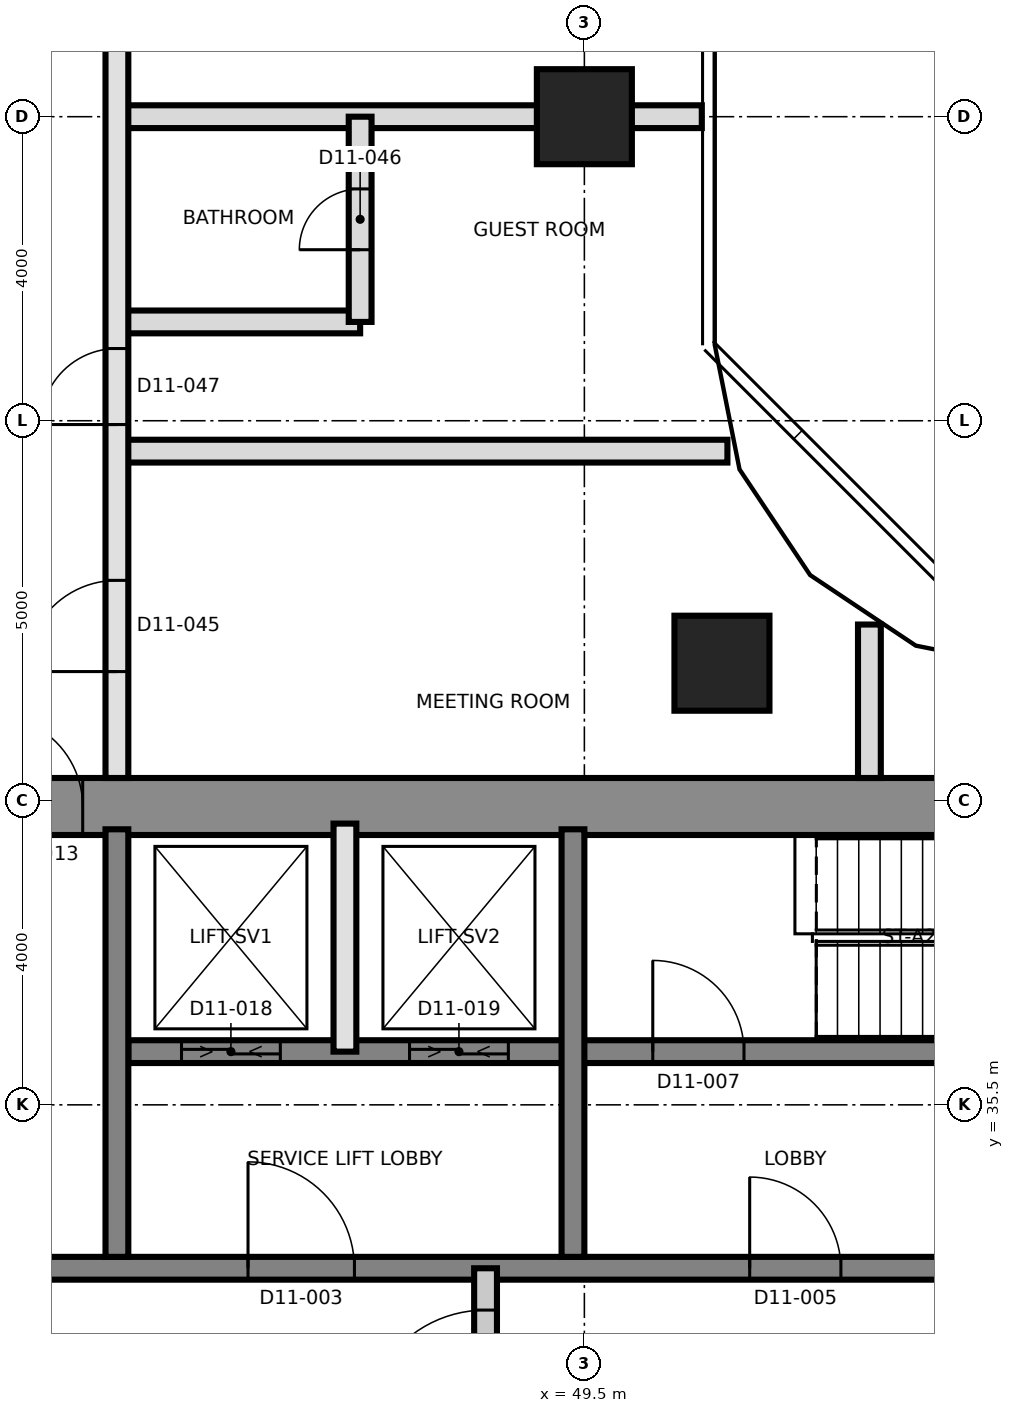
"""IFC4 building model, lengths in metres.
Left out: names, types, materials, properties, quantities, classifications, styles, units other than length and angle.
Written with IfcOpenShell. Run it as: python <this file> out.ifc"""

import sys

from ifc_helpers import new_model, si_unit, direction, frame, frame_2d, origin, origin_2d, place, context, subcontext, project, spatial, rectangle, extrude, element, fill, save


model = new_model("IFC4")
c1 = context("Model", 3, precision=1e-05, world=origin(), true_north=direction((0.0, 1.0)))
c2 = subcontext(c1, "Body", "Model", "MODEL_VIEW")
j1 = project(units=[si_unit("LENGTHUNIT", "METRE"), si_unit("PLANEANGLEUNIT", "RADIAN")], contexts=[c1])
p1 = place(None, origin())
s1 = spatial("IfcSite", under=j1, at=p1, CompositionType="ELEMENT")
p2 = place(p1, origin())
s2 = spatial("IfcBuilding", under=s1, at=p2, CompositionType="ELEMENT")
p3 = place(p2, frame((0.0, 0.0, 124.1)))
s3 = spatial("IfcBuildingStorey", under=s2, at=p3, CompositionType="ELEMENT", Elevation=124.1)
p4 = place(p3, frame((31.125, 39.425, 0.0), z_axis=(0.0, 0.0, 1.0), x_axis=(1.0, 0.0, 0.0)))
e1 = element("IfcWall", 1, at=p4, inside=s3, PredefinedType="SHEAR", context=c2, shape_type="SweptSolid", body=[
    extrude(rectangle(XDim=27.0, YDim=0.75, at=frame_2d((13.5, 0.0))), origin(), (0.0, 0.0, 1.0), 3.7),
])
p5 = place(p4, frame((10.575, 0.0, 0.0)))
e2 = element("IfcOpeningElement", 2, at=p5, cuts=e1, PredefinedType="OPENING", context=c2, shape_type="SweptSolid", body=[
    extrude(rectangle(XDim=1.2, YDim=2.1, at=frame_2d((0.6, 1.05))), frame((0.0, 0.385, 0.0), z_axis=(0.0, -1.0, 0.0), x_axis=(1.0, 0.0, 0.0)), (0.0, 0.0, 1.0), 0.77),
])
p6 = place(p3, frame((31.875, 33.35, 0.0), z_axis=(0.0, 0.0, 1.0), x_axis=(1.0, 0.0, 0.0)))
e3 = element("IfcWall", 3, at=p6, inside=s3, PredefinedType="SHEAR", context=c2, shape_type="SweptSolid", body=[
    extrude(rectangle(XDim=26.25, YDim=0.3, at=frame_2d((13.125, 0.0))), origin(), (0.0, 0.0, 1.0), 3.7),
])
p7 = place(p6, frame((13.2, 0.0, 0.0)))
e4 = element("IfcOpeningElement", 4, at=p7, cuts=e3, PredefinedType="OPENING", context=c2, shape_type="SweptSolid", body=[
    extrude(rectangle(XDim=1.4, YDim=2.1, at=frame_2d((0.7, 1.05))), frame((0.0, 0.16, 0.0), z_axis=(0.0, -1.0, 0.0), x_axis=(1.0, 0.0, 0.0)), (0.0, 0.0, 1.0), 0.32),
])
p8 = place(p6, frame((5.25, 0.0, 0.0)))
e5 = element("IfcOpeningElement", 5, at=p8, cuts=e3, PredefinedType="OPENING", context=c2, shape_type="SweptSolid", body=[
    extrude(rectangle(XDim=1.2, YDim=2.1, at=frame_2d((0.6, 1.05))), frame((0.0, 0.16, 0.0), z_axis=(0.0, -1.0, 0.0), x_axis=(1.0, 0.0, 0.0)), (0.0, 0.0, 1.0), 0.32),
])
p9 = place(p6, frame((19.8, 0.0, 0.0)))
e6 = element("IfcOpeningElement", 6, at=p9, cuts=e3, PredefinedType="OPENING", context=c2, shape_type="SweptSolid", body=[
    extrude(rectangle(XDim=1.2, YDim=2.1, at=frame_2d((0.6, 1.05))), frame((0.0, 0.16, 0.0), z_axis=(0.0, -1.0, 0.0), x_axis=(1.0, 0.0, 0.0)), (0.0, 0.0, 1.0), 0.32),
])
p10 = place(p3, frame((43.5, 36.2, 0.0), z_axis=(0.0, 0.0, 1.0), x_axis=(1.0, 0.0, 0.0)))
e7 = element("IfcWall", 7, at=p10, inside=s3, PredefinedType="SHEAR", context=c2, shape_type="SweptSolid", body=[
    extrude(rectangle(XDim=14.625, YDim=0.3, at=frame_2d((7.312, 0.0))), origin(), (0.0, 0.0, 1.0), 3.7),
])
p11 = place(p10, frame((6.9, 0.0, 0.0)))
e8 = element("IfcOpeningElement", 8, at=p11, cuts=e7, PredefinedType="OPENING", context=c2, shape_type="SweptSolid", body=[
    extrude(rectangle(XDim=1.2, YDim=2.1, at=frame_2d((0.6, 1.05))), frame((0.0, 0.16, 0.0), z_axis=(0.0, -1.0, 0.0), x_axis=(1.0, 0.0, 0.0)), (0.0, 0.0, 1.0), 0.32),
])
p12 = place(p10, frame((0.7, 0.0, 0.0)))
e9 = element("IfcOpeningElement", 9, at=p12, cuts=e7, PredefinedType="OPENING", context=c2, shape_type="SweptSolid", body=[
    extrude(rectangle(XDim=1.3, YDim=2.4, at=frame_2d((0.65, 1.2))), frame((0.0, 0.16, 0.0), z_axis=(0.0, -1.0, 0.0), x_axis=(1.0, 0.0, 0.0)), (0.0, 0.0, 1.0), 0.32),
])
p13 = place(p10, frame((3.7, 0.0, 0.0)))
e10 = element("IfcOpeningElement", 10, at=p13, cuts=e7, PredefinedType="OPENING", context=c2, shape_type="SweptSolid", body=[
    extrude(rectangle(XDim=1.3, YDim=2.4, at=frame_2d((0.65, 1.2))), frame((0.0, 0.16, 0.0), z_axis=(0.0, -1.0, 0.0), x_axis=(1.0, 0.0, 0.0)), (0.0, 0.0, 1.0), 0.32),
])
for number, where, z_axis, x_axis in (
    (11, (43.35, 33.5, 0.0), (0.0, 0.0, 1.0), (0.0, 1.0, 0.0)),
    (12, (49.35, 33.5, 0.0), (0.0, 0.0, 1.0), (0.0, 1.0, 0.0)),
):
    element("IfcWall", number, at=place(p3, frame(where, z_axis=z_axis, x_axis=x_axis)), inside=s3, PredefinedType="SHEAR", context=c2, shape_type="SweptSolid", body=[
        extrude(rectangle(XDim=5.625, YDim=0.3, at=frame_2d((2.812, 0.0))), origin(), (0.0, 0.0, 1.0), 3.7),
    ])
for number, where, z_axis, x_axis in (
    (13, (51.31, 41.31, 0.0), (0.0, 0.0, 1.0), (1.0, 0.0, 0.0)),
    (14, (49.5, 48.5, 0.0), (0.0, 0.0, 1.0), (1.0, 0.0, 0.0)),
):
    element("IfcColumn", number, at=place(p3, frame(where, z_axis=z_axis, x_axis=x_axis)), inside=s3, PredefinedType="COLUMN", context=c2, shape_type="SweptSolid", body=[
        extrude(rectangle(XDim=1.25, YDim=1.25, at=origin_2d()), origin(), (0.0, 0.0, 1.0), 3.7),
    ])
p14 = place(p3, frame((46.35, 36.2, 0.0), z_axis=(0.0, 0.0, 1.0), x_axis=(0.0, 1.0, 0.0)))
e15 = element("IfcWall", 15, at=p14, inside=s3, PredefinedType="SOLIDWALL", context=c2, shape_type="SweptSolid", body=[
    extrude(rectangle(XDim=3.0, YDim=0.3, at=frame_2d((1.5, 0.0))), origin(), (0.0, 0.0, 1.0), 3.4),
])
p15 = place(p3, frame((48.2, 24.9, 0.0), z_axis=(0.0, 0.0, 1.0), x_axis=(0.0, 1.0, 0.0)))
e16 = element("IfcWall", 16, at=p15, inside=s3, PredefinedType="PARTITIONING", context=c2, shape_type="SweptSolid", body=[
    extrude(rectangle(XDim=8.45, YDim=0.3, at=frame_2d((4.225, 0.0))), origin(), (0.0, 0.0, 1.0), 3.4),
])
p16 = place(p15, frame((6.3, 0.0, 0.0)))
e17 = element("IfcOpeningElement", 17, at=p16, cuts=e16, PredefinedType="OPENING", context=c2, shape_type="SweptSolid", body=[
    extrude(rectangle(XDim=1.6, YDim=2.1, at=frame_2d((0.8, 1.05))), frame((0.0, 0.16, 0.0), z_axis=(0.0, -1.0, 0.0), x_axis=(1.0, 0.0, 0.0)), (0.0, 0.0, 1.0), 0.32),
])
p17 = place(p3, frame((43.35, 44.1, 0.0), z_axis=(0.0, 0.0, 1.0), x_axis=(1.0, 0.0, 0.0)))
e18 = element("IfcWall", 18, at=p17, inside=s3, PredefinedType="PARTITIONING", context=c2, shape_type="SweptSolid", body=[
    extrude(rectangle(XDim=8.032, YDim=0.3, at=frame_2d((4.016, 0.0))), origin(), (0.0, 0.0, 1.0), 3.4),
])
p18 = place(p3, frame((43.35, 45.8, 0.0), z_axis=(0.0, 0.0, 1.0), x_axis=(1.0, 0.0, 0.0)))
e19 = element("IfcWall", 19, at=p18, inside=s3, PredefinedType="PARTITIONING", context=c2, shape_type="SweptSolid", body=[
    extrude(rectangle(XDim=3.2, YDim=0.3, at=frame_2d((1.6, 0.0))), origin(), (0.0, 0.0, 1.0), 3.4),
])
p19 = place(p3, frame((43.35, 48.5, 0.0), z_axis=(0.0, 0.0, 1.0), x_axis=(1.0, 0.0, 0.0)))
e20 = element("IfcWall", 20, at=p19, inside=s3, PredefinedType="PARTITIONING", context=c2, shape_type="SweptSolid", body=[
    extrude(rectangle(XDim=7.695, YDim=0.3, at=frame_2d((3.847, 0.0))), origin(), (0.0, 0.0, 1.0), 3.4),
])
p20 = place(p3, frame((43.35, 39.8, 0.0), z_axis=(0.0, 0.0, 1.0), x_axis=(0.0, 1.0, 0.0)))
e21 = element("IfcWall", 21, at=p20, inside=s3, PredefinedType="SOLIDWALL", context=c2, shape_type="SweptSolid", body=[
    extrude(rectangle(XDim=26.0, YDim=0.3, at=frame_2d((13.0, 0.0))), origin(), (0.0, 0.0, 1.0), 3.4),
])
p21 = place(p20, frame((1.4, 0.0, 0.0)))
e22 = element("IfcOpeningElement", 22, at=p21, cuts=e21, PredefinedType="OPENING", context=c2, shape_type="SweptSolid", body=[
    extrude(rectangle(XDim=1.2, YDim=2.1, at=frame_2d((0.6, 1.05))), frame((0.0, 0.16, 0.0), z_axis=(0.0, -1.0, 0.0), x_axis=(1.0, 0.0, 0.0)), (0.0, 0.0, 1.0), 0.32),
])
p22 = place(p20, frame((4.65, 0.0, 0.0)))
e23 = element("IfcOpeningElement", 23, at=p22, cuts=e21, PredefinedType="OPENING", context=c2, shape_type="SweptSolid", body=[
    extrude(rectangle(XDim=1.0, YDim=2.1, at=frame_2d((0.5, 1.05))), frame((0.0, 0.16, 0.0), z_axis=(0.0, -1.0, 0.0), x_axis=(1.0, 0.0, 0.0)), (0.0, 0.0, 1.0), 0.32),
])
p23 = place(p20, frame((9.835, 0.0, 0.0)))
e24 = element("IfcOpeningElement", 24, at=p23, cuts=e21, PredefinedType="OPENING", context=c2, shape_type="SweptSolid", body=[
    extrude(rectangle(XDim=1.2, YDim=2.1, at=frame_2d((0.6, 1.05))), frame((0.0, 0.16, 0.0), z_axis=(0.0, -1.0, 0.0), x_axis=(1.0, 0.0, 0.0)), (0.0, 0.0, 1.0), 0.32),
])
p24 = place(p20, frame((13.085, 0.0, 0.0)))
e25 = element("IfcOpeningElement", 25, at=p24, cuts=e21, PredefinedType="OPENING", context=c2, shape_type="SweptSolid", body=[
    extrude(rectangle(XDim=1.0, YDim=2.1, at=frame_2d((0.5, 1.05))), frame((0.0, 0.16, 0.0), z_axis=(0.0, -1.0, 0.0), x_axis=(1.0, 0.0, 0.0)), (0.0, 0.0, 1.0), 0.32),
])
p25 = place(p20, frame((21.25, 0.0, 0.0)))
e26 = element("IfcOpeningElement", 26, at=p25, cuts=e21, PredefinedType="OPENING", context=c2, shape_type="SweptSolid", body=[
    extrude(rectangle(XDim=1.0, YDim=2.4, at=frame_2d((0.5, 1.2))), frame((0.0, 0.16, 0.0), z_axis=(0.0, -1.0, 0.0), x_axis=(1.0, 0.0, 0.0)), (0.0, 0.0, 1.0), 0.32),
])
p26 = place(p3, frame((46.55, 45.8, 0.0), z_axis=(0.0, 0.0, 1.0), x_axis=(0.0, 1.0, 0.0)))
e27 = element("IfcWall", 27, at=p26, inside=s3, PredefinedType="PARTITIONING", context=c2, shape_type="SweptSolid", body=[
    extrude(rectangle(XDim=2.7, YDim=0.3, at=frame_2d((1.35, 0.0))), origin(), (0.0, 0.0, 1.0), 3.4),
])
p27 = place(p26, frame((0.95, 0.0, 0.0)))
e28 = element("IfcOpeningElement", 28, at=p27, cuts=e27, PredefinedType="OPENING", context=c2, shape_type="SweptSolid", body=[
    extrude(rectangle(XDim=0.8, YDim=2.1, at=frame_2d((0.4, 1.05))), frame((0.0, 0.16, 0.0), z_axis=(0.0, -1.0, 0.0), x_axis=(1.0, 0.0, 0.0)), (0.0, 0.0, 1.0), 0.32),
])
p28 = place(p3, frame((53.25, 39.8, 0.0), z_axis=(0.0, 0.0, 1.0), x_axis=(0.0, 1.0, 0.0)))
e29 = element("IfcWall", 29, at=p28, inside=s3, PredefinedType="PARTITIONING", context=c2, shape_type="SweptSolid", body=[
    extrude(rectangle(XDim=2.019, YDim=0.3, at=frame_2d((1.01, 0.0))), origin(), (0.0, 0.0, 1.0), 3.4),
])
p29 = place(p16, origin())
e30 = element("IfcDoor", 30, at=p29, inside=s3, OperationType="SINGLE_SWING_LEFT", PredefinedType="DOOR", context=c2, shape_type="SweptSolid", body=[
    extrude(rectangle(XDim=1.6, YDim=2.1, at=frame_2d((0.8, 1.05))), frame((0.0, 0.025, 0.0), z_axis=(0.0, -1.0, 0.0), x_axis=(1.0, 0.0, 0.0)), (0.0, 0.0, 1.0), 0.05),
])
fill(e17, e30)
p30 = place(p7, origin())
e31 = element("IfcDoor", 31, at=p30, inside=s3, OperationType="SINGLE_SWING_RIGHT", PredefinedType="DOOR", context=c2, shape_type="SweptSolid", body=[
    extrude(rectangle(XDim=1.4, YDim=2.1, at=frame_2d((0.7, 1.05))), frame((0.0, 0.025, 0.0), z_axis=(0.0, -1.0, 0.0), x_axis=(1.0, 0.0, 0.0)), (0.0, 0.0, 1.0), 0.05),
])
fill(e4, e31)
p31 = place(p9, origin())
e32 = element("IfcDoor", 32, at=p31, inside=s3, OperationType="SINGLE_SWING_RIGHT", PredefinedType="DOOR", context=c2, shape_type="SweptSolid", body=[
    extrude(rectangle(XDim=1.2, YDim=2.1, at=frame_2d((0.6, 1.05))), frame((0.0, 0.025, 0.0), z_axis=(0.0, -1.0, 0.0), x_axis=(1.0, 0.0, 0.0)), (0.0, 0.0, 1.0), 0.05),
])
fill(e6, e32)
p32 = place(p11, origin())
e33 = element("IfcDoor", 33, at=p32, inside=s3, OperationType="SINGLE_SWING_LEFT", PredefinedType="DOOR", context=c2, shape_type="SweptSolid", body=[
    extrude(rectangle(XDim=1.2, YDim=2.1, at=frame_2d((0.6, 1.05))), frame((0.0, 0.025, 0.0), z_axis=(0.0, -1.0, 0.0), x_axis=(1.0, 0.0, 0.0)), (0.0, 0.0, 1.0), 0.05),
])
fill(e8, e33)
p33 = place(p5, origin())
e34 = element("IfcDoor", 34, at=p33, inside=s3, OperationType="SINGLE_SWING_RIGHT", PredefinedType="DOOR", context=c2, shape_type="SweptSolid", body=[
    extrude(rectangle(XDim=1.2, YDim=2.1, at=frame_2d((0.6, 1.05))), frame((0.0, 0.025, 0.0), z_axis=(0.0, -1.0, 0.0), x_axis=(1.0, 0.0, 0.0)), (0.0, 0.0, 1.0), 0.05),
])
fill(e2, e34)
p34 = place(p12, origin())
e35 = element("IfcDoor", 35, at=p34, inside=s3, OperationType="SLIDING_TO_LEFT", PredefinedType="DOOR", context=c2, shape_type="SweptSolid", body=[
    extrude(rectangle(XDim=1.3, YDim=2.4, at=frame_2d((0.65, 1.2))), frame((0.0, 0.025, 0.0), z_axis=(0.0, -1.0, 0.0), x_axis=(1.0, 0.0, 0.0)), (0.0, 0.0, 1.0), 0.05),
])
fill(e9, e35)
p35 = place(p13, origin())
e36 = element("IfcDoor", 36, at=p35, inside=s3, OperationType="SLIDING_TO_LEFT", PredefinedType="DOOR", context=c2, shape_type="SweptSolid", body=[
    extrude(rectangle(XDim=1.3, YDim=2.4, at=frame_2d((0.65, 1.2))), frame((0.0, 0.025, 0.0), z_axis=(0.0, -1.0, 0.0), x_axis=(1.0, 0.0, 0.0)), (0.0, 0.0, 1.0), 0.05),
])
fill(e10, e36)
p36 = place(p21, origin())
e37 = element("IfcDoor", 37, at=p36, inside=s3, OperationType="SINGLE_SWING_LEFT", PredefinedType="DOOR", context=c2, shape_type="SweptSolid", body=[
    extrude(rectangle(XDim=1.2, YDim=2.1, at=frame_2d((0.6, 1.05))), frame((0.0, 0.025, 0.0), z_axis=(0.0, -1.0, 0.0), x_axis=(1.0, 0.0, 0.0)), (0.0, 0.0, 1.0), 0.05),
])
fill(e22, e37)
p37 = place(p27, origin())
e38 = element("IfcDoor", 38, at=p37, inside=s3, OperationType="SINGLE_SWING_RIGHT", PredefinedType="DOOR", context=c2, shape_type="SweptSolid", body=[
    extrude(rectangle(XDim=0.8, YDim=2.1, at=frame_2d((0.4, 1.05))), frame((0.0, 0.025, 0.0), z_axis=(0.0, -1.0, 0.0), x_axis=(1.0, 0.0, 0.0)), (0.0, 0.0, 1.0), 0.05),
])
fill(e28, e38)
p38 = place(p22, origin())
e39 = element("IfcDoor", 39, at=p38, inside=s3, OperationType="SINGLE_SWING_LEFT", PredefinedType="DOOR", context=c2, shape_type="SweptSolid", body=[
    extrude(rectangle(XDim=1.0, YDim=2.1, at=frame_2d((0.5, 1.05))), frame((0.0, 0.025, 0.0), z_axis=(0.0, -1.0, 0.0), x_axis=(1.0, 0.0, 0.0)), (0.0, 0.0, 1.0), 0.05),
])
fill(e23, e39)
save(model, sys.argv[1])
